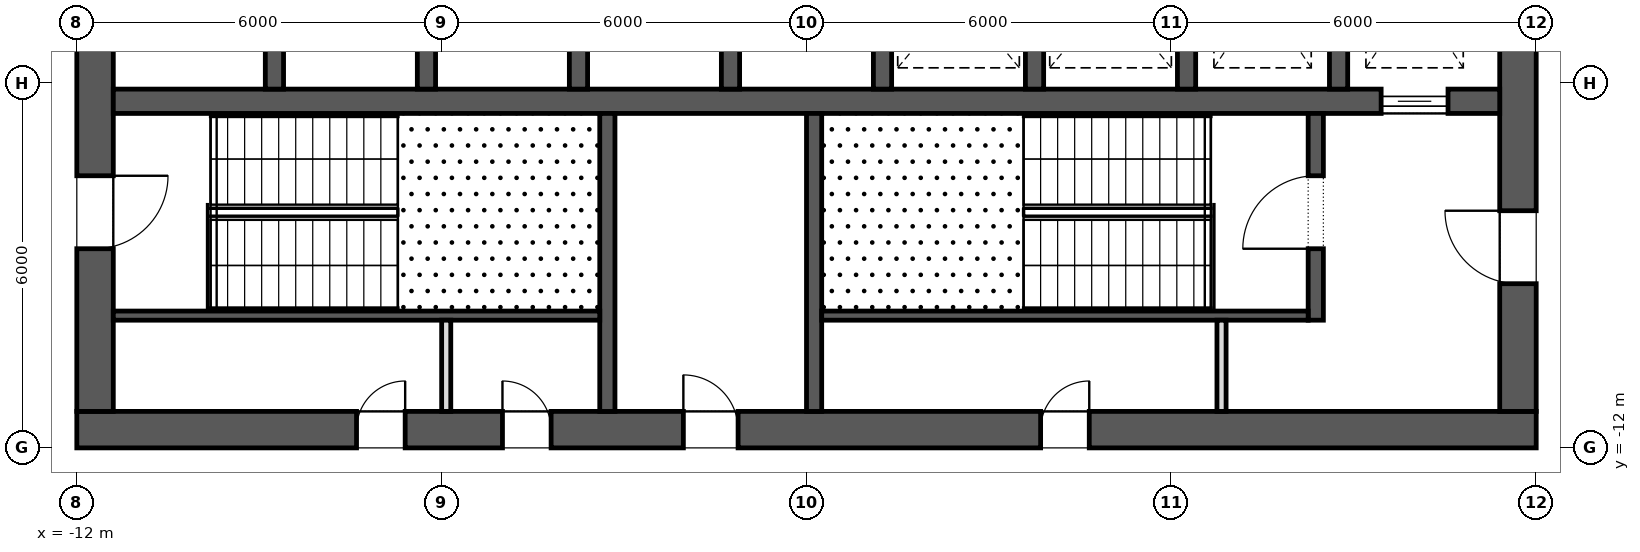
"""IFC4 building model, lengths in metres.
Left out: names, types, materials, properties, quantities, classifications, styles, units other than length and angle.
Written with IfcOpenShell. Run it as: python <this file> out.ifc"""

import sys

from ifc_helpers import new_model, si_unit, direction, frame, frame_2d, origin, place, context, subcontext, project, spatial, rectangle, extrude, element, fill, save


model = new_model("IFC4")
c1 = context("Model", 3, precision=1e-05, world=origin(), true_north=direction((0.0, 1.0)))
c2 = subcontext(c1, "Body", "Model", "MODEL_VIEW")
j1 = project(units=[si_unit("LENGTHUNIT", "METRE"), si_unit("PLANEANGLEUNIT", "RADIAN")], contexts=[c1])
p1 = place(None, origin())
s1 = spatial("IfcSite", under=j1, at=p1, CompositionType="ELEMENT")
p2 = place(p1, origin())
s2 = spatial("IfcBuilding", under=s1, at=p2, CompositionType="ELEMENT")
p3 = place(p2, frame((0.0, 0.0, 138.1)))
s3 = spatial("IfcBuildingStorey", under=s2, at=p3, CompositionType="ELEMENT", Elevation=138.1)
p4 = place(p3, frame((-12.0, -11.7, 0.0), z_axis=(0.0, 0.0, 1.0), x_axis=(1.0, 0.0, 0.0)))
e1 = element("IfcWall", 1, at=p4, inside=s3, PredefinedType="SHEAR", context=c2, shape_type="SweptSolid", body=[
    extrude(rectangle(XDim=24.0, YDim=0.6, at=frame_2d((12.0, 0.0))), origin(), (0.0, 0.0, 1.0), 4.2),
])
p5 = place(p4, frame((9.975, 0.0, 0.0)))
e2 = element("IfcOpeningElement", 2, at=p5, cuts=e1, PredefinedType="OPENING", context=c2, shape_type="SweptSolid", body=[
    extrude(rectangle(XDim=0.9, YDim=2.1, at=frame_2d((0.45, 1.05))), frame((0.0, 0.312, 0.0), z_axis=(0.0, -1.0, 0.0), x_axis=(1.0, 0.0, 0.0)), (0.0, 0.0, 1.0), 0.624),
])
p6 = place(p4, frame((4.6, 0.0, 0.0)))
e3 = element("IfcOpeningElement", 3, at=p6, cuts=e1, PredefinedType="OPENING", context=c2, shape_type="SweptSolid", body=[
    extrude(rectangle(XDim=0.8, YDim=2.1, at=frame_2d((0.4, 1.05))), frame((0.0, 0.312, 0.0), z_axis=(0.0, -1.0, 0.0), x_axis=(1.0, 0.0, 0.0)), (0.0, 0.0, 1.0), 0.624),
])
p7 = place(p4, frame((7.0, 0.0, 0.0)))
e4 = element("IfcOpeningElement", 4, at=p7, cuts=e1, PredefinedType="OPENING", context=c2, shape_type="SweptSolid", body=[
    extrude(rectangle(XDim=0.8, YDim=2.1, at=frame_2d((0.4, 1.05))), frame((0.0, 0.312, 0.0), z_axis=(0.0, -1.0, 0.0), x_axis=(1.0, 0.0, 0.0)), (0.0, 0.0, 1.0), 0.624),
])
p8 = place(p4, frame((15.85, 0.0, 0.0)))
e5 = element("IfcOpeningElement", 5, at=p8, cuts=e1, PredefinedType="OPENING", context=c2, shape_type="SweptSolid", body=[
    extrude(rectangle(XDim=0.8, YDim=2.1, at=frame_2d((0.4, 1.05))), frame((0.0, 0.312, 0.0), z_axis=(0.0, -1.0, 0.0), x_axis=(1.0, 0.0, 0.0)), (0.0, 0.0, 1.0), 0.624),
])
p9 = place(p3, frame((11.7, -11.4, 0.0), z_axis=(0.0, 0.0, 1.0), x_axis=(0.0, 1.0, 0.0)))
e6 = element("IfcWall", 6, at=p9, inside=s3, PredefinedType="SHEAR", context=c2, shape_type="SweptSolid", body=[
    extrude(rectangle(XDim=22.8, YDim=0.6, at=frame_2d((11.4, 0.0))), origin(), (0.0, 0.0, 1.0), 4.2),
])
p10 = place(p9, frame((10.2, 0.0, 0.0)))
e7 = element("IfcOpeningElement", 7, at=p10, cuts=e6, PredefinedType="OPENING", context=c2, shape_type="SweptSolid", body=[
    extrude(rectangle(XDim=2.4, YDim=2.1, at=frame_2d((1.2, 1.05))), frame((0.0, 0.312, 0.0), z_axis=(0.0, -1.0, 0.0), x_axis=(1.0, 0.0, 0.0)), (0.0, 0.0, 1.0), 0.624),
])
p11 = place(p9, frame((19.5, 0.0, 0.0)))
e8 = element("IfcOpeningElement", 8, at=p11, cuts=e6, PredefinedType="OPENING", context=c2, shape_type="SweptSolid", body=[
    extrude(rectangle(XDim=1.2, YDim=2.1, at=frame_2d((0.6, 1.05))), frame((0.0, 0.312, 0.0), z_axis=(0.0, -1.0, 0.0), x_axis=(1.0, 0.0, 0.0)), (0.0, 0.0, 1.0), 0.624),
])
p12 = place(p9, frame((2.1, 0.0, 0.0)))
e9 = element("IfcOpeningElement", 9, at=p12, cuts=e6, PredefinedType="OPENING", context=c2, shape_type="SweptSolid", body=[
    extrude(rectangle(XDim=1.2, YDim=2.1, at=frame_2d((0.6, 1.05))), frame((0.0, 0.312, 0.0), z_axis=(0.0, -1.0, 0.0), x_axis=(1.0, 0.0, 0.0)), (0.0, 0.0, 1.0), 0.624),
])
p13 = place(p3, frame((-11.7, -11.4, 0.0), z_axis=(0.0, 0.0, 1.0), x_axis=(0.0, 1.0, 0.0)))
e10 = element("IfcWall", 10, at=p13, inside=s3, PredefinedType="SHEAR", context=c2, shape_type="SweptSolid", body=[
    extrude(rectangle(XDim=22.8, YDim=0.6, at=frame_2d((11.4, 0.0))), origin(), (0.0, 0.0, 1.0), 4.2),
])
p14 = place(p13, frame((10.2, 0.0, 0.0)))
e11 = element("IfcOpeningElement", 11, at=p14, cuts=e10, PredefinedType="OPENING", context=c2, shape_type="SweptSolid", body=[
    extrude(rectangle(XDim=2.4, YDim=2.1, at=frame_2d((1.2, 1.05))), frame((0.0, 0.312, 0.0), z_axis=(0.0, -1.0, 0.0), x_axis=(1.0, 0.0, 0.0)), (0.0, 0.0, 1.0), 0.624),
])
p15 = place(p13, frame((18.925, 0.0, 0.0)))
e12 = element("IfcOpeningElement", 12, at=p15, cuts=e10, PredefinedType="OPENING", context=c2, shape_type="SweptSolid", body=[
    extrude(rectangle(XDim=1.2, YDim=2.1, at=frame_2d((0.6, 1.05))), frame((0.0, 0.312, 0.0), z_axis=(0.0, -1.0, 0.0), x_axis=(1.0, 0.0, 0.0)), (0.0, 0.0, 1.0), 0.624),
])
p16 = place(p13, frame((2.675, 0.0, 0.0)))
e13 = element("IfcOpeningElement", 13, at=p16, cuts=e10, PredefinedType="OPENING", context=c2, shape_type="SweptSolid", body=[
    extrude(rectangle(XDim=1.2, YDim=2.1, at=frame_2d((0.6, 1.05))), frame((0.0, 0.312, 0.0), z_axis=(0.0, -1.0, 0.0), x_axis=(1.0, 0.0, 0.0)), (0.0, 0.0, 1.0), 0.624),
])
p17 = place(p3, frame((-11.4, -6.3, 0.0), z_axis=(0.0, 0.0, 1.0), x_axis=(1.0, 0.0, 0.0)))
e14 = element("IfcWall", 14, at=p17, inside=s3, PredefinedType="SHEAR", context=c2, shape_type="SweptSolid", body=[
    extrude(rectangle(XDim=22.8, YDim=0.4, at=frame_2d((11.4, 0.0))), origin(), (0.0, 0.0, 1.0), 4.2),
])
p18 = place(p17, frame((20.85, 0.0, 0.0)))
e15 = element("IfcOpeningElement", 15, at=p18, cuts=e14, PredefinedType="OPENING", context=c2, shape_type="SweptSolid", body=[
    extrude(rectangle(XDim=1.1, YDim=2.1, at=frame_2d((0.55, 1.05))), frame((0.0, 0.212, 0.0), z_axis=(0.0, -1.0, 0.0), x_axis=(1.0, 0.0, 0.0)), (0.0, 0.0, 1.0), 0.424),
])
for number, where, z_axis, x_axis in (
    (16, (-8.75, -6.1, 0.0), (0.0, 0.0, 1.0), (0.0, 1.0, 0.0)),
    (17, (-6.25, -6.1, 0.0), (0.0, 0.0, 1.0), (0.0, 1.0, 0.0)),
    (18, (-3.75, -6.1, 0.0), (0.0, 0.0, 1.0), (0.0, 1.0, 0.0)),
    (19, (-1.25, -6.1, 0.0), (0.0, 0.0, 1.0), (0.0, 1.0, 0.0)),
    (20, (1.25, -6.1, 0.0), (0.0, 0.0, 1.0), (0.0, 1.0, 0.0)),
    (21, (3.75, -6.1, 0.0), (0.0, 0.0, 1.0), (0.0, 1.0, 0.0)),
    (22, (6.25, -6.1, 0.0), (0.0, 0.0, 1.0), (0.0, 1.0, 0.0)),
    (23, (8.75, -6.1, 0.0), (0.0, 0.0, 1.0), (0.0, 1.0, 0.0)),
):
    element("IfcWall", number, at=place(p3, frame(where, z_axis=z_axis, x_axis=x_axis)), inside=s3, PredefinedType="SHEAR", context=c2, shape_type="SweptSolid", body=[
        extrude(rectangle(XDim=2.9, YDim=0.3, at=frame_2d((1.45, 0.0))), origin(), (0.0, 0.0, 1.0), 4.2),
    ])
for number, where, z_axis, x_axis in (
    (24, (-3.275, -11.4, 0.0), (0.0, 0.0, 1.0), (0.0, 1.0, 0.0)),
    (25, (0.125, -11.4, 0.0), (0.0, 0.0, 1.0), (0.0, 1.0, 0.0)),
):
    element("IfcWall", number, at=place(p3, frame(where, z_axis=z_axis, x_axis=x_axis)), inside=s3, PredefinedType="SHEAR", context=c2, shape_type="SweptSolid", body=[
        extrude(rectangle(XDim=4.9, YDim=0.25, at=frame_2d((2.45, 0.0))), origin(), (0.0, 0.0, 1.0), 3.9),
    ])
p19 = place(p3, frame((8.375, -9.9, 0.0), z_axis=(0.0, 0.0, 1.0), x_axis=(0.0, 1.0, 0.0)))
e26 = element("IfcWall", 26, at=p19, inside=s3, PredefinedType="SHEAR", context=c2, shape_type="SweptSolid", body=[
    extrude(rectangle(XDim=3.4, YDim=0.25, at=frame_2d((1.7, 0.0))), origin(), (0.0, 0.0, 1.0), 3.9),
])
p20 = place(p19, frame((1.175, 0.0, 0.0)))
e27 = element("IfcOpeningElement", 27, at=p20, cuts=e26, PredefinedType="OPENING", context=c2, shape_type="SweptSolid", body=[
    extrude(rectangle(XDim=1.2, YDim=2.1, at=frame_2d((0.6, 1.05))), frame((0.0, 0.137, 0.0), z_axis=(0.0, -1.0, 0.0), x_axis=(1.0, 0.0, 0.0)), (0.0, 0.0, 1.0), 0.274),
])
for number, where, z_axis, x_axis in (
    (28, (-11.4, -9.825, 0.0), (0.0, 0.0, 1.0), (1.0, 0.0, 0.0)),
    (29, (0.25, -9.825, 0.0), (0.0, 0.0, 1.0), (1.0, 0.0, 0.0)),
):
    element("IfcWall", number, at=place(p3, frame(where, z_axis=z_axis, x_axis=x_axis)), inside=s3, PredefinedType="SHEAR", context=c2, shape_type="SweptSolid", body=[
        extrude(rectangle(XDim=8.0, YDim=0.15, at=frame_2d((4.0, 0.0))), origin(), (0.0, 0.0, 1.0), 3.9),
    ])
for number, where, z_axis, x_axis in (
    (30, (-5.925, -11.4, 0.0), (0.0, 0.0, 1.0), (0.0, 1.0, 0.0)),
    (31, (6.825, -11.4, 0.0), (0.0, 0.0, 1.0), (0.0, 1.0, 0.0)),
):
    element("IfcWall", number, at=place(p3, frame(where, z_axis=z_axis, x_axis=x_axis)), inside=s3, PredefinedType="PARTITIONING", context=c2, shape_type="SweptSolid", body=[
        extrude(rectangle(XDim=1.5, YDim=0.15, at=frame_2d((0.75, 0.0))), origin(), (0.0, 0.0, 1.0), 3.9),
    ])
p21 = place(p18, origin())
e32 = element("IfcDoor", 32, at=p21, inside=s3, OperationType="SLIDING_TO_LEFT", PredefinedType="DOOR", context=c2, shape_type="SweptSolid", body=[
    extrude(rectangle(XDim=1.1, YDim=2.1, at=frame_2d((0.55, 1.05))), frame((0.0, 0.025, 0.0), z_axis=(0.0, -1.0, 0.0), x_axis=(1.0, 0.0, 0.0)), (0.0, 0.0, 1.0), 0.05),
])
fill(e15, e32)
p22 = place(p16, frame((1.2, 0.0, 0.0), z_axis=(0.0, 0.0, 1.0), x_axis=(-1.0, 0.0, 0.0)))
e33 = element("IfcDoor", 33, at=p22, inside=s3, OperationType="SINGLE_SWING_RIGHT", PredefinedType="DOOR", context=c2, shape_type="SweptSolid", body=[
    extrude(rectangle(XDim=1.2, YDim=2.1, at=frame_2d((0.6, 1.05))), frame((0.0, 0.025, 0.0), z_axis=(0.0, -1.0, 0.0), x_axis=(1.0, 0.0, 0.0)), (0.0, 0.0, 1.0), 0.05),
])
fill(e13, e33)
p23 = place(p20, origin())
e34 = element("IfcDoor", 34, at=p23, inside=s3, OperationType="SINGLE_SWING_RIGHT", PredefinedType="DOOR", context=c2, shape_type="SweptSolid", body=[
    extrude(rectangle(XDim=1.2, YDim=2.1, at=frame_2d((0.6, 1.05))), frame((0.0, 0.025, 0.0), z_axis=(0.0, -1.0, 0.0), x_axis=(1.0, 0.0, 0.0)), (0.0, 0.0, 1.0), 0.05),
])
fill(e27, e34)
p24 = place(p12, origin())
e35 = element("IfcDoor", 35, at=p24, inside=s3, OperationType="SINGLE_SWING_LEFT", PredefinedType="DOOR", context=c2, shape_type="SweptSolid", body=[
    extrude(rectangle(XDim=1.2, YDim=2.1, at=frame_2d((0.6, 1.05))), frame((0.0, 0.025, 0.0), z_axis=(0.0, -1.0, 0.0), x_axis=(1.0, 0.0, 0.0)), (0.0, 0.0, 1.0), 0.05),
])
fill(e9, e35)
p25 = place(p5, origin())
e36 = element("IfcDoor", 36, at=p25, inside=s3, OperationType="SINGLE_SWING_RIGHT", PredefinedType="DOOR", context=c2, shape_type="SweptSolid", body=[
    extrude(rectangle(XDim=0.9, YDim=2.1, at=frame_2d((0.45, 1.05))), frame((0.0, 0.025, 0.0), z_axis=(0.0, -1.0, 0.0), x_axis=(1.0, 0.0, 0.0)), (0.0, 0.0, 1.0), 0.05),
])
fill(e2, e36)
p26 = place(p6, origin())
e37 = element("IfcDoor", 37, at=p26, inside=s3, OperationType="SINGLE_SWING_LEFT", PredefinedType="DOOR", context=c2, shape_type="SweptSolid", body=[
    extrude(rectangle(XDim=0.8, YDim=2.1, at=frame_2d((0.4, 1.05))), frame((0.0, 0.025, 0.0), z_axis=(0.0, -1.0, 0.0), x_axis=(1.0, 0.0, 0.0)), (0.0, 0.0, 1.0), 0.05),
])
fill(e3, e37)
p27 = place(p7, origin())
e38 = element("IfcDoor", 38, at=p27, inside=s3, OperationType="SINGLE_SWING_RIGHT", PredefinedType="DOOR", context=c2, shape_type="SweptSolid", body=[
    extrude(rectangle(XDim=0.8, YDim=2.1, at=frame_2d((0.4, 1.05))), frame((0.0, 0.025, 0.0), z_axis=(0.0, -1.0, 0.0), x_axis=(1.0, 0.0, 0.0)), (0.0, 0.0, 1.0), 0.05),
])
fill(e4, e38)
p28 = place(p8, origin())
e39 = element("IfcDoor", 39, at=p28, inside=s3, OperationType="SINGLE_SWING_LEFT", PredefinedType="DOOR", context=c2, shape_type="SweptSolid", body=[
    extrude(rectangle(XDim=0.8, YDim=2.1, at=frame_2d((0.4, 1.05))), frame((0.0, 0.025, 0.0), z_axis=(0.0, -1.0, 0.0), x_axis=(1.0, 0.0, 0.0)), (0.0, 0.0, 1.0), 0.05),
])
fill(e5, e39)
save(model, sys.argv[1])
